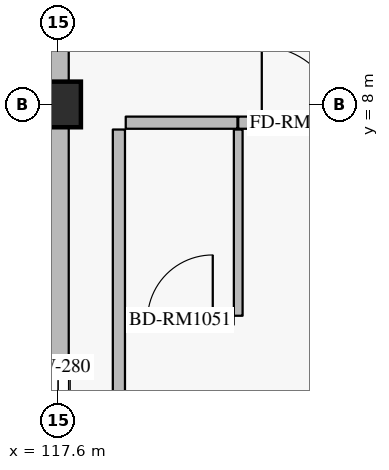
"""IFC4 building model, lengths in metres.
Left out: names, types, materials, properties, quantities, classifications, styles, units other than length and angle.
Written with IfcOpenShell. Run it as: python <this file> out.ifc"""

import sys

from ifc_helpers import new_model, si_unit, direction, frame, frame_2d, origin, origin_2d, place, context, subcontext, project, spatial, rectangle, extrude, element, fill, save


model = new_model("IFC4")
c1 = context("Model", 3, precision=1e-05, world=origin(), true_north=direction((0.0, 1.0)))
c2 = subcontext(c1, "Body", "Model", "MODEL_VIEW")
j1 = project(units=[si_unit("LENGTHUNIT", "METRE"), si_unit("PLANEANGLEUNIT", "RADIAN")], contexts=[c1])
p1 = place(None, origin())
s1 = spatial("IfcSite", under=j1, at=p1, CompositionType="ELEMENT")
p2 = place(p1, origin())
s2 = spatial("IfcBuilding", under=s1, at=p2, CompositionType="ELEMENT")
p3 = place(p2, frame((0.0, 0.0, 39.6)))
s3 = spatial("IfcBuildingStorey", under=s2, at=p3, CompositionType="ELEMENT", Elevation=39.6)
p4 = place(p3, frame((117.6, 8.0, 0.0), z_axis=(0.0, 0.0, 1.0), x_axis=(1.0, 0.0, 0.0)))
e1 = element("IfcColumn", 1, at=p4, inside=s3, PredefinedType="COLUMN", context=c2, shape_type="SweptSolid", body=[
    extrude(rectangle(XDim=0.6, YDim=0.6, at=origin_2d()), origin(), (0.0, 0.0, 1.0), 3.6),
])
p5 = place(p3, frame((117.6, 0.3, 0.0), z_axis=(0.0, 0.0, 1.0), x_axis=(0.0, 1.0, 0.0)))
e2 = element("IfcWall", 2, at=p5, inside=s3, PredefinedType="SOLIDWALL", context=c2, shape_type="SweptSolid", body=[
    extrude(rectangle(XDim=7.4, YDim=0.28, at=frame_2d((3.7, 0.0))), origin(), (0.0, 0.0, 1.0), 2.7),
])
p6 = place(p5, frame((3.05, 0.0, 0.5)))
e3 = element("IfcOpeningElement", 3, at=p6, cuts=e2, PredefinedType="OPENING", context=c2, shape_type="SweptSolid", body=[
    extrude(rectangle(XDim=1.3, YDim=1.65, at=frame_2d((0.65, 0.825))), frame((0.0, 0.15, 0.0), z_axis=(0.0, -1.0, 0.0), x_axis=(1.0, 0.0, 0.0)), (0.0, 0.0, 1.0), 0.3),
])
p7 = place(p3, frame((117.6, 8.3, 0.0), z_axis=(0.0, 0.0, 1.0), x_axis=(0.0, 1.0, 0.0)))
e4 = element("IfcWall", 4, at=p7, inside=s3, PredefinedType="SOLIDWALL", context=c2, shape_type="SweptSolid", body=[
    extrude(rectangle(XDim=7.4, YDim=0.28, at=frame_2d((3.7, 0.0))), origin(), (0.0, 0.0, 1.0), 2.7),
])
p8 = place(p7, frame((3.05, 0.0, 0.5)))
e5 = element("IfcOpeningElement", 5, at=p8, cuts=e4, PredefinedType="OPENING", context=c2, shape_type="SweptSolid", body=[
    extrude(rectangle(XDim=1.3, YDim=1.65, at=frame_2d((0.65, 0.825))), frame((0.0, 0.15, 0.0), z_axis=(0.0, -1.0, 0.0), x_axis=(1.0, 0.0, 0.0)), (0.0, 0.0, 1.0), 0.3),
])
p9 = place(p3, frame((118.49, 7.76, 0.0), z_axis=(0.0, 0.0, 1.0), x_axis=(1.0, 0.0, 0.0)))
e6 = element("IfcWall", 6, at=p9, inside=s3, PredefinedType="PARTITIONING", context=c2, shape_type="SweptSolid", body=[
    extrude(rectangle(XDim=1.47, YDim=0.16, at=frame_2d((0.735, 0.0))), origin(), (0.0, 0.0, 1.0), 3.335),
])
p10 = place(p3, frame((119.97, 7.76, 0.0), z_axis=(0.0, 0.0, 1.0), x_axis=(1.0, 0.0, 0.0)))
e7 = element("IfcWall", 7, at=p10, inside=s3, PredefinedType="PARTITIONING", context=c2, shape_type="SweptSolid", body=[
    extrude(rectangle(XDim=1.62, YDim=0.16, at=frame_2d((0.81, 0.0))), origin(), (0.0, 0.0, 1.0), 3.335),
])
p11 = place(p10, frame((0.31, 0.0, 0.0)))
e8 = element("IfcOpeningElement", 8, at=p11, cuts=e7, PredefinedType="OPENING", context=c2, shape_type="SweptSolid", body=[
    extrude(rectangle(XDim=1.0, YDim=2.25, at=frame_2d((0.5, 1.125))), frame((0.0, 0.09, 0.0), z_axis=(0.0, -1.0, 0.0), x_axis=(1.0, 0.0, 0.0)), (0.0, 0.0, 1.0), 0.18),
])
p12 = place(p3, frame((119.97, 5.22, 0.0), z_axis=(0.0, 0.0, 1.0), x_axis=(0.0, 1.0, 0.0)))
e9 = element("IfcWall", 9, at=p12, inside=s3, PredefinedType="PARTITIONING", context=c2, shape_type="SweptSolid", body=[
    extrude(rectangle(XDim=2.45, YDim=0.115, at=frame_2d((1.225, 0.0))), origin(), (0.0, 0.0, 1.0), 3.335),
])
p13 = place(p3, frame((118.5, 5.16, 0.0), z_axis=(0.0, 0.0, 1.0), x_axis=(1.0, 0.0, 0.0)))
e10 = element("IfcWall", 10, at=p13, inside=s3, PredefinedType="PARTITIONING", context=c2, shape_type="SweptSolid", body=[
    extrude(rectangle(XDim=1.41, YDim=0.115, at=frame_2d((0.705, 0.0))), origin(), (0.0, 0.0, 1.0), 3.335),
])
p14 = place(p13, frame((0.275, 0.0, 0.0)))
e11 = element("IfcOpeningElement", 11, at=p14, cuts=e10, PredefinedType="OPENING", context=c2, shape_type="SweptSolid", body=[
    extrude(rectangle(XDim=0.86, YDim=2.12, at=frame_2d((0.43, 1.06))), frame((0.0, 0.067, 0.0), z_axis=(0.0, -1.0, 0.0), x_axis=(1.0, 0.0, 0.0)), (0.0, 0.0, 1.0), 0.135),
])
p15 = place(p3, frame((118.4, 0.34, 0.0), z_axis=(0.0, 0.0, 1.0), x_axis=(0.0, 1.0, 0.0)))
e12 = element("IfcWall", 12, at=p15, inside=s3, PredefinedType="PARTITIONING", context=c2, shape_type="SweptSolid", body=[
    extrude(rectangle(XDim=7.33, YDim=0.16, at=frame_2d((3.665, 0.0))), origin(), (0.0, 0.0, 1.0), 3.335),
])
p16 = place(p6, origin())
e13 = element("IfcWindow", 13, at=p16, inside=s3, PartitioningType="SINGLE_PANEL", PredefinedType="WINDOW", context=c2, shape_type="SweptSolid", body=[
    extrude(rectangle(XDim=1.3, YDim=1.65, at=frame_2d((0.65, 0.825))), frame((0.0, 0.03, 0.0), z_axis=(0.0, -1.0, 0.0), x_axis=(1.0, 0.0, 0.0)), (0.0, 0.0, 1.0), 0.06),
])
fill(e3, e13)
p17 = place(p11, origin())
e14 = element("IfcDoor", 14, at=p17, inside=s3, OperationType="SINGLE_SWING_LEFT", PredefinedType="DOOR", context=c2, shape_type="SweptSolid", body=[
    extrude(rectangle(XDim=1.0, YDim=2.25, at=frame_2d((0.5, 1.125))), frame((0.0, 0.025, 0.0), z_axis=(0.0, -1.0, 0.0), x_axis=(1.0, 0.0, 0.0)), (0.0, 0.0, 1.0), 0.05),
])
fill(e8, e14)
p18 = place(p14, origin())
e15 = element("IfcDoor", 15, at=p18, inside=s3, OperationType="SINGLE_SWING_RIGHT", PredefinedType="DOOR", context=c2, shape_type="SweptSolid", body=[
    extrude(rectangle(XDim=0.86, YDim=2.12, at=frame_2d((0.43, 1.06))), frame((0.0, 0.025, 0.0), z_axis=(0.0, -1.0, 0.0), x_axis=(1.0, 0.0, 0.0)), (0.0, 0.0, 1.0), 0.05),
])
fill(e11, e15)
save(model, sys.argv[1])
